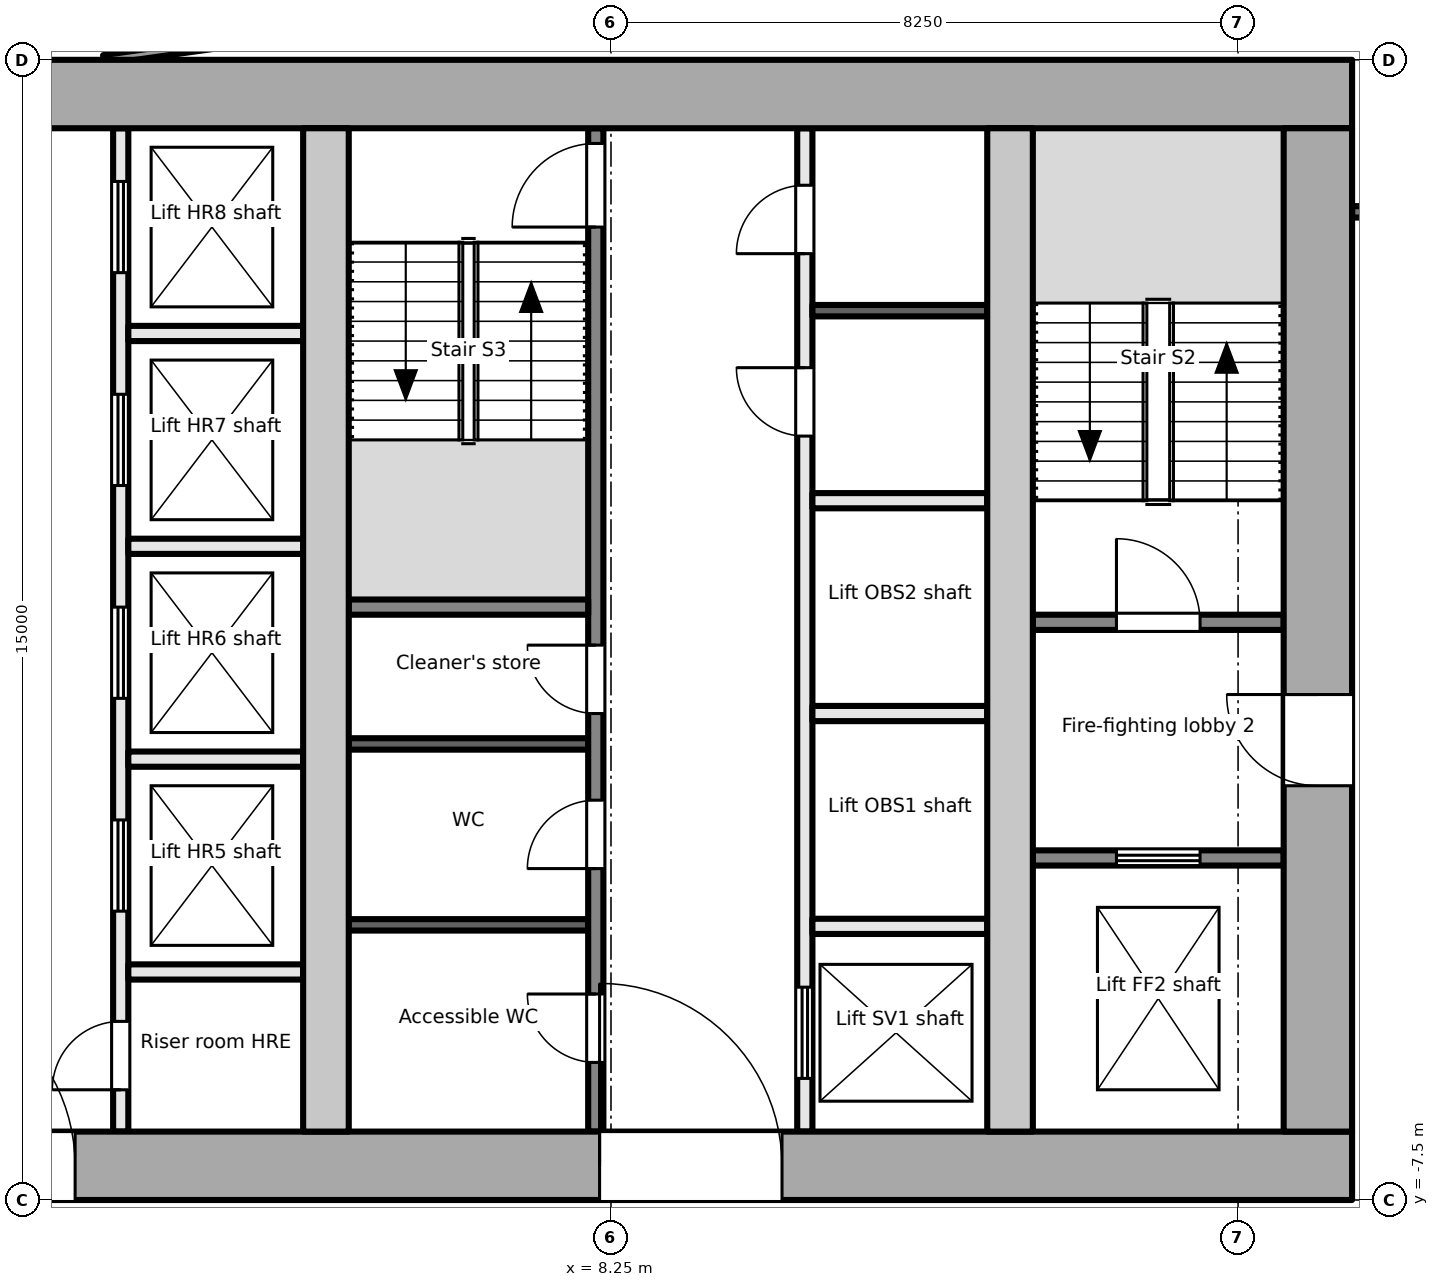
"""IFC4 building model, lengths in metres.
Left out: names, types, materials, properties, quantities, classifications, styles, units other than length and angle.
Written with IfcOpenShell. Run it as: python <this file> out.ifc"""

import sys

from ifc_helpers import new_model, si_unit, direction, frame, frame_2d, origin, place, context, subcontext, project, spatial, rectangle, extrude, element, fill, save


model = new_model("IFC4")
c1 = context("Model", 3, precision=1e-05, world=origin(), true_north=direction((0.0, 1.0)))
c2 = subcontext(c1, "Body", "Model", "MODEL_VIEW")
j1 = project(units=[si_unit("LENGTHUNIT", "METRE"), si_unit("PLANEANGLEUNIT", "RADIAN")], contexts=[c1])
p1 = place(None, origin())
s1 = spatial("IfcSite", under=j1, at=p1, CompositionType="ELEMENT")
p2 = place(p1, origin())
s2 = spatial("IfcBuilding", under=s1, at=p2, CompositionType="ELEMENT")
p3 = place(p2, frame((0.0, 0.0, 278.5)))
s3 = spatial("IfcBuildingStorey", under=s2, at=p3, CompositionType="ELEMENT", Elevation=278.5)
p4 = place(p3, frame((-18.0, -7.05, -0.2), z_axis=(0.0, 0.0, 1.0), x_axis=(1.0, 0.0, 0.0)))
e1 = element("IfcWall", 1, at=p4, inside=s3, PredefinedType="SHEAR", context=c2, shape_type="SweptSolid", body=[
    extrude(rectangle(XDim=36.0, YDim=0.9, at=frame_2d((18.0, 0.0))), origin(), (0.0, 0.0, 1.0), 3.9),
])
p5 = place(p4, frame((8.1, 0.0, 0.2)))
e2 = element("IfcOpeningElement", 2, at=p5, cuts=e1, PredefinedType="OPENING", context=c2, shape_type="SweptSolid", body=[
    extrude(rectangle(XDim=1.8, YDim=2.1, at=frame_2d((0.9, 1.05))), frame((0.0, 0.46, 0.0), z_axis=(0.0, -1.0, 0.0), x_axis=(1.0, 0.0, 0.0)), (0.0, 0.0, 1.0), 0.921),
])
p6 = place(p4, frame((16.8, 0.0, 0.2)))
e3 = element("IfcOpeningElement", 3, at=p6, cuts=e1, PredefinedType="OPENING", context=c2, shape_type="SweptSolid", body=[
    extrude(rectangle(XDim=2.4, YDim=2.1, at=frame_2d((1.2, 1.05))), frame((0.0, 0.46, 0.0), z_axis=(0.0, -1.0, 0.0), x_axis=(1.0, 0.0, 0.0)), (0.0, 0.0, 1.0), 0.921),
])
p7 = place(p4, frame((26.1, 0.0, 0.2)))
e4 = element("IfcOpeningElement", 4, at=p7, cuts=e1, PredefinedType="OPENING", context=c2, shape_type="SweptSolid", body=[
    extrude(rectangle(XDim=2.4, YDim=2.1, at=frame_2d((1.2, 1.05))), frame((0.0, 0.46, 0.0), z_axis=(0.0, -1.0, 0.0), x_axis=(1.0, 0.0, 0.0)), (0.0, 0.0, 1.0), 0.921),
])
p8 = place(p3, frame((-18.0, 7.05, -0.2), z_axis=(0.0, 0.0, 1.0), x_axis=(1.0, 0.0, 0.0)))
e5 = element("IfcWall", 5, at=p8, inside=s3, PredefinedType="SHEAR", context=c2, shape_type="SweptSolid", body=[
    extrude(rectangle(XDim=36.0, YDim=0.9, at=frame_2d((18.0, 0.0))), origin(), (0.0, 0.0, 1.0), 3.9),
])
p9 = place(p3, frame((17.55, -6.6, -0.2), z_axis=(0.0, 0.0, 1.0), x_axis=(0.0, 1.0, 0.0)))
e6 = element("IfcWall", 6, at=p9, inside=s3, PredefinedType="SHEAR", context=c2, shape_type="SweptSolid", body=[
    extrude(rectangle(XDim=13.2, YDim=0.9, at=frame_2d((6.6, 0.0))), origin(), (0.0, 0.0, 1.0), 3.9),
])
p10 = place(p9, frame((4.55, 0.0, 0.2)))
e7 = element("IfcOpeningElement", 7, at=p10, cuts=e6, PredefinedType="OPENING", context=c2, shape_type="SweptSolid", body=[
    extrude(rectangle(XDim=1.2, YDim=2.1, at=frame_2d((0.6, 1.05))), frame((0.0, 0.46, 0.0), z_axis=(0.0, -1.0, 0.0), x_axis=(1.0, 0.0, 0.0)), (0.0, 0.0, 1.0), 0.921),
])
for number, where, z_axis, x_axis in (
    (8, (4.5, -6.6, -0.2), (0.0, 0.0, 1.0), (0.0, 1.0, 0.0)),
    (9, (13.5, -6.6, -0.2), (0.0, 0.0, 1.0), (0.0, 1.0, 0.0)),
):
    element("IfcWall", number, at=place(p3, frame(where, z_axis=z_axis, x_axis=x_axis)), inside=s3, PredefinedType="SHEAR", context=c2, shape_type="SweptSolid", body=[
        extrude(rectangle(XDim=13.2, YDim=0.6, at=frame_2d((6.6, 0.0))), origin(), (0.0, 0.0, 1.0), 3.9),
    ])
p11 = place(p3, frame((13.8, -3.0, 0.0), z_axis=(0.0, 0.0, 1.0), x_axis=(1.0, 0.0, 0.0)))
e10 = element("IfcWall", 10, at=p11, inside=s3, PredefinedType="PARTITIONING", context=c2, shape_type="SweptSolid", body=[
    extrude(rectangle(XDim=3.3, YDim=0.2, at=frame_2d((1.65, 0.0))), origin(), (0.0, 0.0, 1.0), 3.7),
])
p12 = place(p11, frame((1.1, 0.0, 0.0)))
e11 = element("IfcOpeningElement", 11, at=p12, cuts=e10, PredefinedType="OPENING", context=c2, shape_type="SweptSolid", body=[
    extrude(rectangle(XDim=1.1, YDim=2.1, at=frame_2d((0.55, 1.05))), frame((0.0, 0.111, 0.0), z_axis=(0.0, -1.0, 0.0), x_axis=(1.0, 0.0, 0.0)), (0.0, 0.0, 1.0), 0.221),
])
p13 = place(p3, frame((13.8, 0.1, 0.0), z_axis=(0.0, 0.0, 1.0), x_axis=(1.0, 0.0, 0.0)))
e12 = element("IfcWall", 12, at=p13, inside=s3, PredefinedType="PARTITIONING", context=c2, shape_type="SweptSolid", body=[
    extrude(rectangle(XDim=3.3, YDim=0.2, at=frame_2d((1.65, 0.0))), origin(), (0.0, 0.0, 1.0), 3.7),
])
p14 = place(p13, frame((1.1, 0.0, 0.0)))
e13 = element("IfcOpeningElement", 13, at=p14, cuts=e12, PredefinedType="OPENING", context=c2, shape_type="SweptSolid", body=[
    extrude(rectangle(XDim=1.1, YDim=2.1, at=frame_2d((0.55, 1.05))), frame((0.0, 0.111, 0.0), z_axis=(0.0, -1.0, 0.0), x_axis=(1.0, 0.0, 0.0)), (0.0, 0.0, 1.0), 0.221),
])
p15 = place(p3, frame((1.8, -6.6, 0.0), z_axis=(0.0, 0.0, 1.0), x_axis=(0.0, 1.0, 0.0)))
e14 = element("IfcWall", 14, at=p15, inside=s3, PredefinedType="PARTITIONING", context=c2, shape_type="SweptSolid", body=[
    extrude(rectangle(XDim=13.2, YDim=0.2, at=frame_2d((6.6, 0.0))), origin(), (0.0, 0.0, 1.0), 3.7),
])
p16 = place(p15, frame((0.55, 0.0, 0.0)))
e15 = element("IfcOpeningElement", 15, at=p16, cuts=e14, PredefinedType="OPENING", context=c2, shape_type="SweptSolid", body=[
    extrude(rectangle(XDim=0.9, YDim=2.1, at=frame_2d((0.45, 1.05))), frame((0.0, 0.111, 0.0), z_axis=(0.0, -1.0, 0.0), x_axis=(1.0, 0.0, 0.0)), (0.0, 0.0, 1.0), 0.221),
])
p17 = place(p15, frame((2.9, 0.0, 0.0)))
e16 = element("IfcOpeningElement", 16, at=p17, cuts=e14, PredefinedType="OPENING", context=c2, shape_type="SweptSolid", body=[
    extrude(rectangle(XDim=1.2, YDim=2.1, at=frame_2d((0.6, 1.05))), frame((0.0, 0.111, 0.0), z_axis=(0.0, -1.0, 0.0), x_axis=(1.0, 0.0, 0.0)), (0.0, 0.0, 1.0), 0.221),
])
p18 = place(p15, frame((5.7, 0.0, 0.0)))
e17 = element("IfcOpeningElement", 17, at=p18, cuts=e14, PredefinedType="OPENING", context=c2, shape_type="SweptSolid", body=[
    extrude(rectangle(XDim=1.2, YDim=2.1, at=frame_2d((0.6, 1.05))), frame((0.0, 0.111, 0.0), z_axis=(0.0, -1.0, 0.0), x_axis=(1.0, 0.0, 0.0)), (0.0, 0.0, 1.0), 0.221),
])
p19 = place(p15, frame((8.5, 0.0, 0.0)))
e18 = element("IfcOpeningElement", 18, at=p19, cuts=e14, PredefinedType="OPENING", context=c2, shape_type="SweptSolid", body=[
    extrude(rectangle(XDim=1.2, YDim=2.1, at=frame_2d((0.6, 1.05))), frame((0.0, 0.111, 0.0), z_axis=(0.0, -1.0, 0.0), x_axis=(1.0, 0.0, 0.0)), (0.0, 0.0, 1.0), 0.221),
])
p20 = place(p15, frame((11.3, 0.0, 0.0)))
e19 = element("IfcOpeningElement", 19, at=p20, cuts=e14, PredefinedType="OPENING", context=c2, shape_type="SweptSolid", body=[
    extrude(rectangle(XDim=1.2, YDim=2.1, at=frame_2d((0.6, 1.05))), frame((0.0, 0.111, 0.0), z_axis=(0.0, -1.0, 0.0), x_axis=(1.0, 0.0, 0.0)), (0.0, 0.0, 1.0), 0.221),
])
for number, where, z_axis, x_axis in (
    (20, (1.9, -1.7, 0.0), (0.0, 0.0, 1.0), (1.0, 0.0, 0.0)),
    (21, (1.9, 1.1, 0.0), (0.0, 0.0, 1.0), (1.0, 0.0, 0.0)),
    (22, (1.9, 3.9, 0.0), (0.0, 0.0, 1.0), (1.0, 0.0, 0.0)),
    (23, (1.9, -4.5, 0.0), (0.0, 0.0, 1.0), (1.0, 0.0, 0.0)),
):
    element("IfcWall", number, at=place(p3, frame(where, z_axis=z_axis, x_axis=x_axis)), inside=s3, PredefinedType="PARTITIONING", context=c2, shape_type="SweptSolid", body=[
        extrude(rectangle(XDim=2.3, YDim=0.2, at=frame_2d((1.15, 0.0))), origin(), (0.0, 0.0, 1.0), 3.7),
    ])
p21 = place(p3, frame((8.05, -6.6, 0.0), z_axis=(0.0, 0.0, 1.0), x_axis=(0.0, 1.0, 0.0)))
e24 = element("IfcWall", 24, at=p21, inside=s3, PredefinedType="PARTITIONING", context=c2, shape_type="SweptSolid", body=[
    extrude(rectangle(XDim=13.2, YDim=0.2, at=frame_2d((6.6, 0.0))), origin(), (0.0, 0.0, 1.0), 3.7),
])
p22 = place(p21, frame((0.91, 0.0, 0.0)))
e25 = element("IfcOpeningElement", 25, at=p22, cuts=e24, PredefinedType="OPENING", context=c2, shape_type="SweptSolid", body=[
    extrude(rectangle(XDim=0.9, YDim=2.1, at=frame_2d((0.45, 1.05))), frame((0.0, 0.111, 0.0), z_axis=(0.0, -1.0, 0.0), x_axis=(1.0, 0.0, 0.0)), (0.0, 0.0, 1.0), 0.221),
])
p23 = place(p21, frame((3.46, 0.0, 0.0)))
e26 = element("IfcOpeningElement", 26, at=p23, cuts=e24, PredefinedType="OPENING", context=c2, shape_type="SweptSolid", body=[
    extrude(rectangle(XDim=0.9, YDim=2.1, at=frame_2d((0.45, 1.05))), frame((0.0, 0.111, 0.0), z_axis=(0.0, -1.0, 0.0), x_axis=(1.0, 0.0, 0.0)), (0.0, 0.0, 1.0), 0.221),
])
p24 = place(p21, frame((5.5, 0.0, 0.0)))
e27 = element("IfcOpeningElement", 27, at=p24, cuts=e24, PredefinedType="OPENING", context=c2, shape_type="SweptSolid", body=[
    extrude(rectangle(XDim=0.9, YDim=2.1, at=frame_2d((0.45, 1.05))), frame((0.0, 0.111, 0.0), z_axis=(0.0, -1.0, 0.0), x_axis=(1.0, 0.0, 0.0)), (0.0, 0.0, 1.0), 0.221),
])
p25 = place(p21, frame((11.9, 0.0, 0.0)))
e28 = element("IfcOpeningElement", 28, at=p25, cuts=e24, PredefinedType="OPENING", context=c2, shape_type="SweptSolid", body=[
    extrude(rectangle(XDim=1.1, YDim=2.1, at=frame_2d((0.55, 1.05))), frame((0.0, 0.111, 0.0), z_axis=(0.0, -1.0, 0.0), x_axis=(1.0, 0.0, 0.0)), (0.0, 0.0, 1.0), 0.221),
])
p26 = place(p3, frame((10.8, -6.6, 0.0), z_axis=(0.0, 0.0, 1.0), x_axis=(0.0, 1.0, 0.0)))
e29 = element("IfcWall", 29, at=p26, inside=s3, PredefinedType="PARTITIONING", context=c2, shape_type="SweptSolid", body=[
    extrude(rectangle(XDim=13.2, YDim=0.2, at=frame_2d((6.6, 0.0))), origin(), (0.0, 0.0, 1.0), 3.7),
])
p27 = place(p26, frame((0.7, 0.0, 0.0)))
e30 = element("IfcOpeningElement", 30, at=p27, cuts=e29, PredefinedType="OPENING", context=c2, shape_type="SweptSolid", body=[
    extrude(rectangle(XDim=1.2, YDim=2.1, at=frame_2d((0.6, 1.05))), frame((0.0, 0.111, 0.0), z_axis=(0.0, -1.0, 0.0), x_axis=(1.0, 0.0, 0.0)), (0.0, 0.0, 1.0), 0.221),
])
p28 = place(p26, frame((9.15, 0.0, 0.0)))
e31 = element("IfcOpeningElement", 31, at=p28, cuts=e29, PredefinedType="OPENING", context=c2, shape_type="SweptSolid", body=[
    extrude(rectangle(XDim=0.9, YDim=2.1, at=frame_2d((0.45, 1.05))), frame((0.0, 0.111, 0.0), z_axis=(0.0, -1.0, 0.0), x_axis=(1.0, 0.0, 0.0)), (0.0, 0.0, 1.0), 0.221),
])
p29 = place(p26, frame((11.55, 0.0, 0.0)))
e32 = element("IfcOpeningElement", 32, at=p29, cuts=e29, PredefinedType="OPENING", context=c2, shape_type="SweptSolid", body=[
    extrude(rectangle(XDim=0.9, YDim=2.1, at=frame_2d((0.45, 1.05))), frame((0.0, 0.111, 0.0), z_axis=(0.0, -1.0, 0.0), x_axis=(1.0, 0.0, 0.0)), (0.0, 0.0, 1.0), 0.221),
])
p30 = place(p3, frame((4.8, 0.3, 0.0), z_axis=(0.0, 0.0, 1.0), x_axis=(1.0, 0.0, 0.0)))
e33 = element("IfcWall", 33, at=p30, inside=s3, PredefinedType="PARTITIONING", context=c2, shape_type="SweptSolid", body=[
    extrude(rectangle(XDim=3.15, YDim=0.2, at=frame_2d((1.575, 0.0))), origin(), (0.0, 0.0, 1.0), 3.7),
])
for number, where, z_axis, x_axis in (
    (34, (4.8, -3.88, 0.0), (0.0, 0.0, 1.0), (1.0, 0.0, 0.0)),
    (35, (4.8, -1.5, 0.0), (0.0, 0.0, 1.0), (1.0, 0.0, 0.0)),
):
    element("IfcWall", number, at=place(p3, frame(where, z_axis=z_axis, x_axis=x_axis)), inside=s3, PredefinedType="PARTITIONING", context=c2, shape_type="SweptSolid", body=[
        extrude(rectangle(XDim=3.15, YDim=0.15, at=frame_2d((1.575, 0.0))), origin(), (0.0, 0.0, 1.0), 3.7),
    ])
for number, where, z_axis, x_axis in (
    (36, (10.9, -3.9, 0.0), (0.0, 0.0, 1.0), (1.0, 0.0, 0.0)),
    (37, (10.9, -1.1, 0.0), (0.0, 0.0, 1.0), (1.0, 0.0, 0.0)),
    (38, (10.9, 1.7, 0.0), (0.0, 0.0, 1.0), (1.0, 0.0, 0.0)),
):
    element("IfcWall", number, at=place(p3, frame(where, z_axis=z_axis, x_axis=x_axis)), inside=s3, PredefinedType="PARTITIONING", context=c2, shape_type="SweptSolid", body=[
        extrude(rectangle(XDim=2.3, YDim=0.2, at=frame_2d((1.15, 0.0))), origin(), (0.0, 0.0, 1.0), 3.7),
    ])
p31 = place(p3, frame((10.9, 4.2, 0.0), z_axis=(0.0, 0.0, 1.0), x_axis=(1.0, 0.0, 0.0)))
e39 = element("IfcWall", 39, at=p31, inside=s3, PredefinedType="PARTITIONING", context=c2, shape_type="SweptSolid", body=[
    extrude(rectangle(XDim=2.3, YDim=0.15, at=frame_2d((1.15, 0.0))), origin(), (0.0, 0.0, 1.0), 3.7),
])
p32 = place(p3, frame((18.0, 5.5, 0.0), z_axis=(0.0, 0.0, 1.0), x_axis=(1.0, 0.0, 0.0)))
e40 = element("IfcWall", 40, at=p32, inside=s3, PredefinedType="PARTITIONING", context=c2, shape_type="SweptSolid", body=[
    extrude(rectangle(XDim=2.925, YDim=0.15, at=frame_2d((1.462, 0.0))), origin(), (0.0, 0.0, 1.0), 3.7),
])
p33 = place(p3, frame((1.576, 7.502, 0.0), z_axis=(0.0, 0.0, 1.0), x_axis=(0.990319013032, 0.138810130855, 0.0)))
e41 = element("IfcWall", 41, at=p33, inside=s3, PredefinedType="PARTITIONING", context=c2, shape_type="SweptSolid", body=[
    extrude(rectangle(XDim=1.859, YDim=0.12, at=frame_2d((0.93, 0.0))), origin(), (0.0, 0.0, 1.0), 3.7),
])
p34 = place(p12, origin())
e42 = element("IfcDoor", 42, at=p34, inside=s3, OperationType="DOUBLE_DOOR_SLIDING", PredefinedType="DOOR", context=c2, shape_type="SweptSolid", body=[
    extrude(rectangle(XDim=1.1, YDim=2.1, at=frame_2d((0.55, 1.05))), frame((0.0, 0.025, 0.0), z_axis=(0.0, -1.0, 0.0), x_axis=(1.0, 0.0, 0.0)), (0.0, 0.0, 1.0), 0.05),
])
fill(e11, e42)
p35 = place(p10, origin())
e43 = element("IfcDoor", 43, at=p35, inside=s3, OperationType="SINGLE_SWING_RIGHT", PredefinedType="DOOR", context=c2, shape_type="SweptSolid", body=[
    extrude(rectangle(XDim=1.2, YDim=2.1, at=frame_2d((0.6, 1.05))), frame((0.0, 0.025, 0.0), z_axis=(0.0, -1.0, 0.0), x_axis=(1.0, 0.0, 0.0)), (0.0, 0.0, 1.0), 0.05),
])
fill(e7, e43)
p36 = place(p14, origin())
e44 = element("IfcDoor", 44, at=p36, inside=s3, OperationType="SINGLE_SWING_LEFT", PredefinedType="DOOR", context=c2, shape_type="SweptSolid", body=[
    extrude(rectangle(XDim=1.1, YDim=2.1, at=frame_2d((0.55, 1.05))), frame((0.0, 0.025, 0.0), z_axis=(0.0, -1.0, 0.0), x_axis=(1.0, 0.0, 0.0)), (0.0, 0.0, 1.0), 0.05),
])
fill(e13, e44)
p37 = place(p16, origin())
e45 = element("IfcDoor", 45, at=p37, inside=s3, OperationType="SINGLE_SWING_LEFT", PredefinedType="DOOR", context=c2, shape_type="SweptSolid", body=[
    extrude(rectangle(XDim=0.9, YDim=2.1, at=frame_2d((0.45, 1.05))), frame((0.0, 0.025, 0.0), z_axis=(0.0, -1.0, 0.0), x_axis=(1.0, 0.0, 0.0)), (0.0, 0.0, 1.0), 0.05),
])
fill(e15, e45)
p38 = place(p17, origin())
e46 = element("IfcDoor", 46, at=p38, inside=s3, OperationType="DOUBLE_DOOR_SLIDING", PredefinedType="DOOR", context=c2, shape_type="SweptSolid", body=[
    extrude(rectangle(XDim=1.2, YDim=2.1, at=frame_2d((0.6, 1.05))), frame((0.0, 0.025, 0.0), z_axis=(0.0, -1.0, 0.0), x_axis=(1.0, 0.0, 0.0)), (0.0, 0.0, 1.0), 0.05),
])
fill(e16, e46)
p39 = place(p18, origin())
e47 = element("IfcDoor", 47, at=p39, inside=s3, OperationType="DOUBLE_DOOR_SLIDING", PredefinedType="DOOR", context=c2, shape_type="SweptSolid", body=[
    extrude(rectangle(XDim=1.2, YDim=2.1, at=frame_2d((0.6, 1.05))), frame((0.0, 0.025, 0.0), z_axis=(0.0, -1.0, 0.0), x_axis=(1.0, 0.0, 0.0)), (0.0, 0.0, 1.0), 0.05),
])
fill(e17, e47)
p40 = place(p19, origin())
e48 = element("IfcDoor", 48, at=p40, inside=s3, OperationType="DOUBLE_DOOR_SLIDING", PredefinedType="DOOR", context=c2, shape_type="SweptSolid", body=[
    extrude(rectangle(XDim=1.2, YDim=2.1, at=frame_2d((0.6, 1.05))), frame((0.0, 0.025, 0.0), z_axis=(0.0, -1.0, 0.0), x_axis=(1.0, 0.0, 0.0)), (0.0, 0.0, 1.0), 0.05),
])
fill(e18, e48)
p41 = place(p20, origin())
e49 = element("IfcDoor", 49, at=p41, inside=s3, OperationType="DOUBLE_DOOR_SLIDING", PredefinedType="DOOR", context=c2, shape_type="SweptSolid", body=[
    extrude(rectangle(XDim=1.2, YDim=2.1, at=frame_2d((0.6, 1.05))), frame((0.0, 0.025, 0.0), z_axis=(0.0, -1.0, 0.0), x_axis=(1.0, 0.0, 0.0)), (0.0, 0.0, 1.0), 0.05),
])
fill(e19, e49)
p42 = place(p6, origin())
e50 = element("IfcDoor", 50, at=p42, inside=s3, OperationType="DOUBLE_DOOR_DOUBLE_SWING", PredefinedType="DOOR", context=c2, shape_type="SweptSolid", body=[
    extrude(rectangle(XDim=2.4, YDim=2.1, at=frame_2d((1.2, 1.05))), frame((0.0, 0.025, 0.0), z_axis=(0.0, -1.0, 0.0), x_axis=(1.0, 0.0, 0.0)), (0.0, 0.0, 1.0), 0.05),
])
fill(e3, e50)
p43 = place(p22, origin())
e51 = element("IfcDoor", 51, at=p43, inside=s3, OperationType="SINGLE_SWING_RIGHT", PredefinedType="DOOR", context=c2, shape_type="SweptSolid", body=[
    extrude(rectangle(XDim=0.9, YDim=2.1, at=frame_2d((0.45, 1.05))), frame((0.0, 0.025, 0.0), z_axis=(0.0, -1.0, 0.0), x_axis=(1.0, 0.0, 0.0)), (0.0, 0.0, 1.0), 0.05),
])
fill(e25, e51)
p44 = place(p23, origin())
e52 = element("IfcDoor", 52, at=p44, inside=s3, OperationType="SINGLE_SWING_LEFT", PredefinedType="DOOR", context=c2, shape_type="SweptSolid", body=[
    extrude(rectangle(XDim=0.9, YDim=2.1, at=frame_2d((0.45, 1.05))), frame((0.0, 0.025, 0.0), z_axis=(0.0, -1.0, 0.0), x_axis=(1.0, 0.0, 0.0)), (0.0, 0.0, 1.0), 0.05),
])
fill(e26, e52)
p45 = place(p24, origin())
e53 = element("IfcDoor", 53, at=p45, inside=s3, OperationType="SINGLE_SWING_RIGHT", PredefinedType="DOOR", context=c2, shape_type="SweptSolid", body=[
    extrude(rectangle(XDim=0.9, YDim=2.1, at=frame_2d((0.45, 1.05))), frame((0.0, 0.025, 0.0), z_axis=(0.0, -1.0, 0.0), x_axis=(1.0, 0.0, 0.0)), (0.0, 0.0, 1.0), 0.05),
])
fill(e27, e53)
p46 = place(p25, origin())
e54 = element("IfcDoor", 54, at=p46, inside=s3, OperationType="SINGLE_SWING_LEFT", PredefinedType="DOOR", context=c2, shape_type="SweptSolid", body=[
    extrude(rectangle(XDim=1.1, YDim=2.1, at=frame_2d((0.55, 1.05))), frame((0.0, 0.025, 0.0), z_axis=(0.0, -1.0, 0.0), x_axis=(1.0, 0.0, 0.0)), (0.0, 0.0, 1.0), 0.05),
])
fill(e28, e54)
p47 = place(p7, origin())
e55 = element("IfcDoor", 55, at=p47, inside=s3, OperationType="DOUBLE_DOOR_DOUBLE_SWING", PredefinedType="DOOR", context=c2, shape_type="SweptSolid", body=[
    extrude(rectangle(XDim=2.4, YDim=2.1, at=frame_2d((1.2, 1.05))), frame((0.0, 0.025, 0.0), z_axis=(0.0, -1.0, 0.0), x_axis=(1.0, 0.0, 0.0)), (0.0, 0.0, 1.0), 0.05),
])
fill(e4, e55)
p48 = place(p27, origin())
e56 = element("IfcDoor", 56, at=p48, inside=s3, OperationType="DOUBLE_DOOR_SLIDING", PredefinedType="DOOR", context=c2, shape_type="SweptSolid", body=[
    extrude(rectangle(XDim=1.2, YDim=2.1, at=frame_2d((0.6, 1.05))), frame((0.0, 0.025, 0.0), z_axis=(0.0, -1.0, 0.0), x_axis=(1.0, 0.0, 0.0)), (0.0, 0.0, 1.0), 0.05),
])
fill(e30, e56)
p49 = place(p28, origin())
e57 = element("IfcDoor", 57, at=p49, inside=s3, OperationType="SINGLE_SWING_RIGHT", PredefinedType="DOOR", context=c2, shape_type="SweptSolid", body=[
    extrude(rectangle(XDim=0.9, YDim=2.1, at=frame_2d((0.45, 1.05))), frame((0.0, 0.025, 0.0), z_axis=(0.0, -1.0, 0.0), x_axis=(1.0, 0.0, 0.0)), (0.0, 0.0, 1.0), 0.05),
])
fill(e31, e57)
p50 = place(p29, origin())
e58 = element("IfcDoor", 58, at=p50, inside=s3, OperationType="SINGLE_SWING_LEFT", PredefinedType="DOOR", context=c2, shape_type="SweptSolid", body=[
    extrude(rectangle(XDim=0.9, YDim=2.1, at=frame_2d((0.45, 1.05))), frame((0.0, 0.025, 0.0), z_axis=(0.0, -1.0, 0.0), x_axis=(1.0, 0.0, 0.0)), (0.0, 0.0, 1.0), 0.05),
])
fill(e32, e58)
save(model, sys.argv[1])
